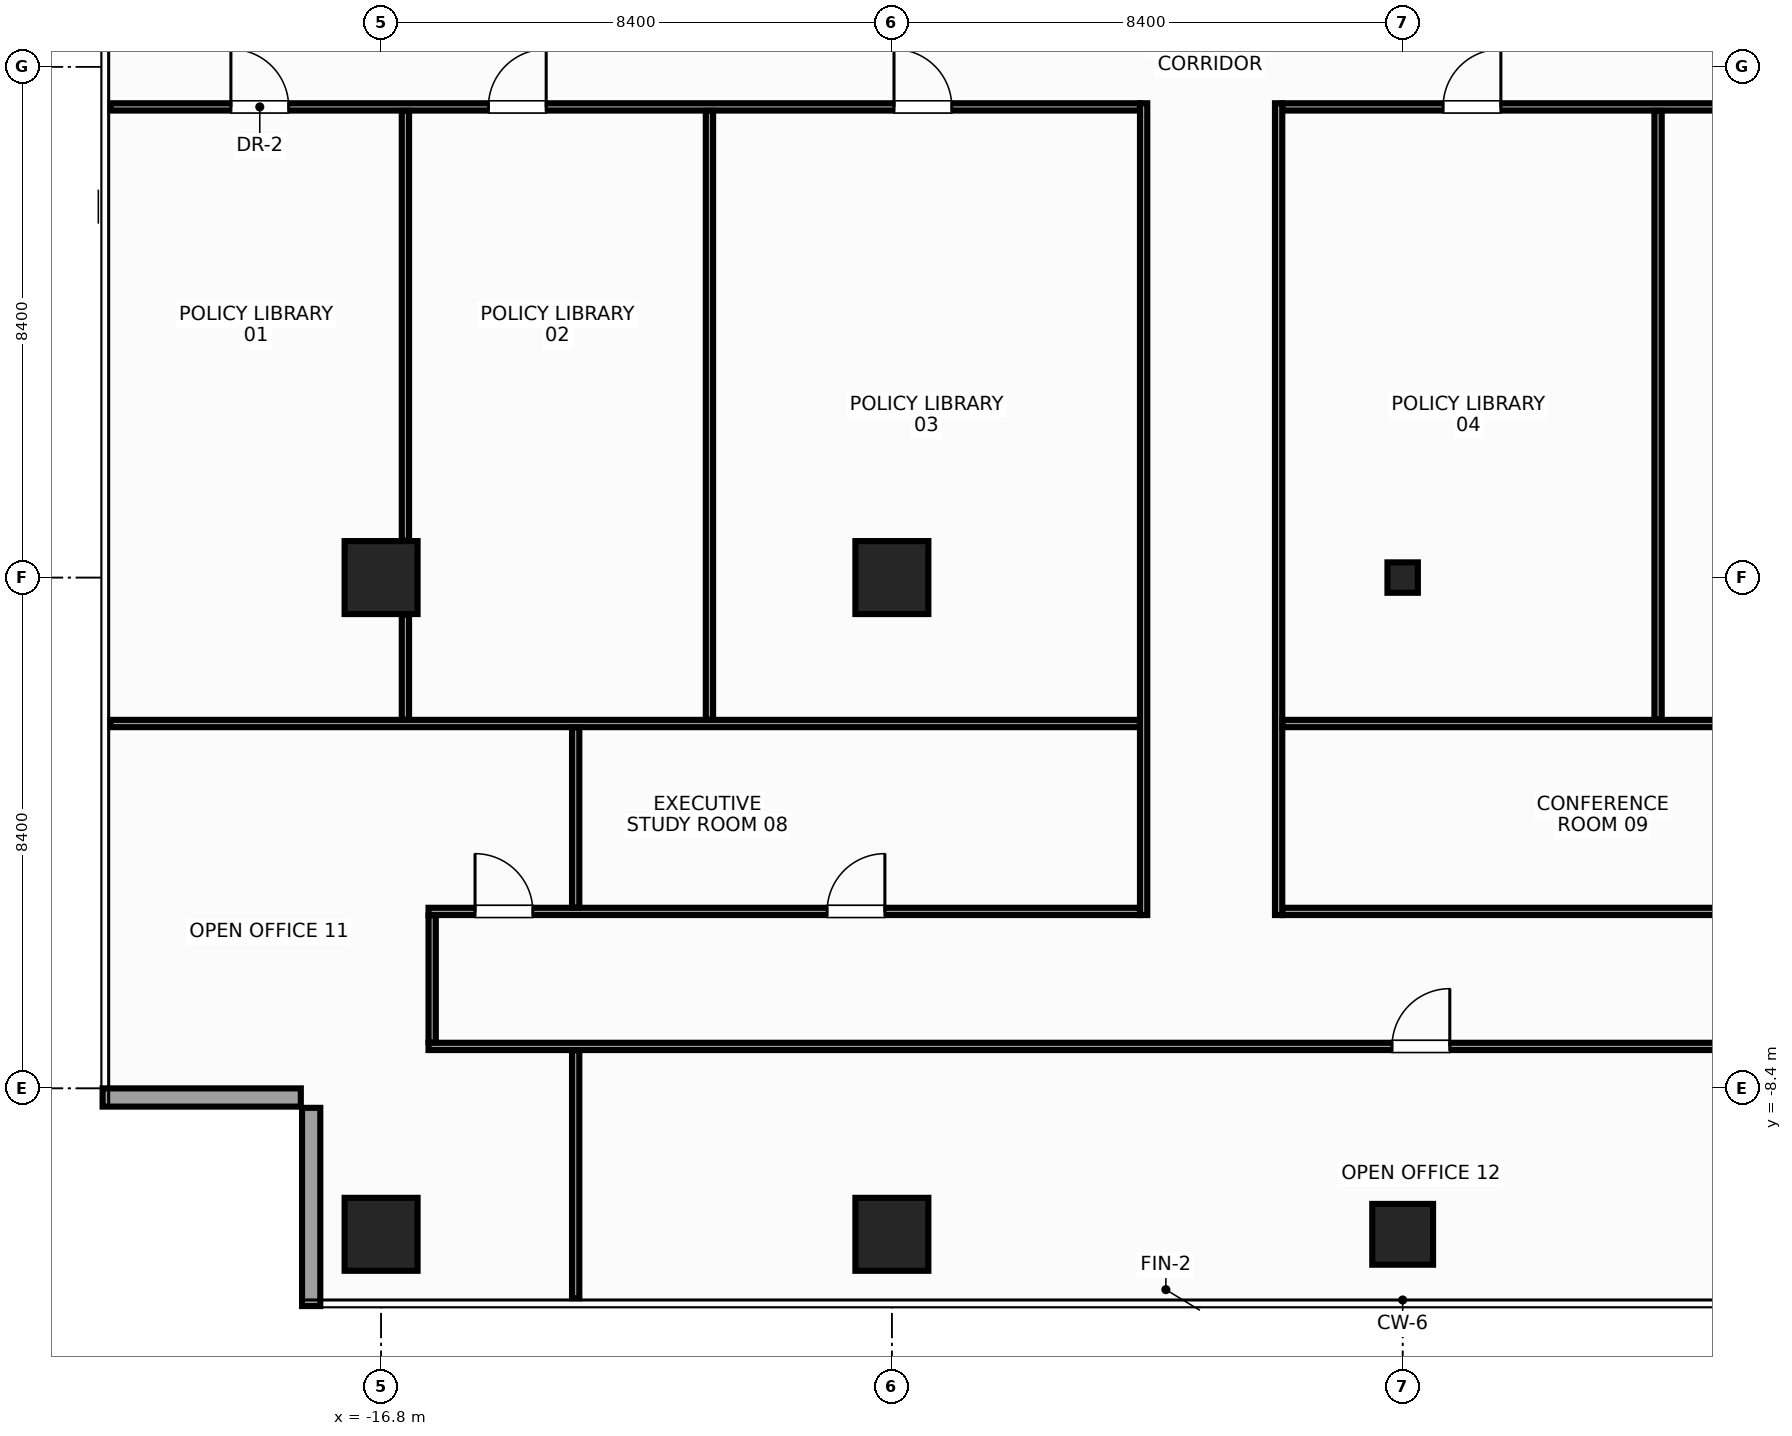
"""IFC4 building model, lengths in metres.
Left out: names, types, materials, properties, quantities, classifications, styles, units other than length and angle.
Written with IfcOpenShell. Run it as: python <this file> out.ifc"""

import sys

from ifc_helpers import new_model, si_unit, direction, frame, frame_2d, origin, origin_with_axes, origin_2d, place, context, subcontext, project, spatial, rectangle, hollow_rectangle, extrude, source, transform, mapped, element, fill, save


model = new_model("IFC4")
c1 = context("Model", 3, precision=1e-05, world=origin(), true_north=direction((0.0, 1.0)))
c2 = subcontext(c1, "Body", "Model", "MODEL_VIEW")
j1 = project(units=[si_unit("LENGTHUNIT", "METRE"), si_unit("PLANEANGLEUNIT", "RADIAN")], contexts=[c1])
p1 = place(None, origin())
s1 = spatial("IfcSite", under=j1, at=p1, CompositionType="ELEMENT")
p2 = place(p1, origin())
s2 = spatial("IfcBuilding", under=s1, at=p2, CompositionType="ELEMENT")
p3 = place(p2, frame((0.0, 0.0, 275.6)))
s3 = spatial("IfcBuildingStorey", under=s2, at=p3, CompositionType="ELEMENT", Elevation=275.6)
m1 = source(origin(), c2, "Body", "SweptSolid", [
    extrude(rectangle(XDim=1.2, YDim=1.2, at=origin_2d()), origin(), (0.0, 0.0, 1.0), 3.6),
])
for number, where, z_axis, x_axis in (
    (1, (-16.8, -10.8, 0.0), (0.0, 0.0, 1.0), (1.0, 0.0, 0.0)),
    (2, (-16.8, 0.0, 0.0), (0.0, 0.0, 1.0), (1.0, 0.0, 0.0)),
    (3, (-8.4, 0.0, 0.0), (0.0, 0.0, 1.0), (1.0, 0.0, 0.0)),
    (4, (-8.4, -10.8, 0.0), (0.0, 0.0, 1.0), (1.0, 0.0, 0.0)),
):
    element("IfcColumn", number, at=place(p3, frame(where, z_axis=z_axis, x_axis=x_axis)), inside=s3, PredefinedType="COLUMN", context=c2, shape_type="MappedRepresentation", body=[
        mapped(m1, transform((0.0, 0.0, 0.0), x_axis=(1.0, 0.0, 0.0), y_axis=(0.0, 1.0, 0.0), z_axis=(0.0, 0.0, 1.0), scale=1.0)),
    ])
m2 = source(origin(), c2, "Body", "SweptSolid", [
    extrude(rectangle(XDim=1.0, YDim=1.0, at=origin_2d()), origin(), (0.0, 0.0, 1.0), 3.6),
])
p4 = place(p3, frame((0.0, -10.8, 0.0), z_axis=(0.0, 0.0, 1.0), x_axis=(1.0, 0.0, 0.0)))
e5 = element("IfcColumn", 5, at=p4, inside=s3, PredefinedType="COLUMN", context=c2, shape_type="MappedRepresentation", body=[
    mapped(m2, transform((0.0, 0.0, 0.0), x_axis=(1.0, 0.0, 0.0), y_axis=(0.0, 1.0, 0.0), z_axis=(0.0, 0.0, 1.0), scale=1.0)),
])
m3 = source(origin(), c2, "Body", "SweptSolid", [
    extrude(hollow_rectangle(XDim=0.5, YDim=0.5, WallThickness=0.025, at=origin_2d()), origin(), (0.0, 0.0, 1.0), 3.6),
])
p5 = place(p3, origin_with_axes())
e6 = element("IfcColumn", 6, at=p5, inside=s3, PredefinedType="COLUMN", context=c2, shape_type="MappedRepresentation", body=[
    mapped(m3, transform((0.0, 0.0, 0.0), x_axis=(1.0, 0.0, 0.0), y_axis=(0.0, 1.0, 0.0), z_axis=(0.0, 0.0, 1.0), scale=1.0)),
])
m4 = source(origin(), c2, "Body", "SweptSolid", [
    extrude(rectangle(XDim=3.26, YDim=0.3, at=frame_2d((1.63, 0.0))), origin(), (0.0, 0.0, 1.0), 2.75),
])
p6 = place(p3, frame((-21.38, -8.55, 0.0), z_axis=(0.0, 0.0, 1.0), x_axis=(1.0, 0.0, 0.0)))
e7 = element("IfcWall", 7, at=p6, inside=s3, PredefinedType="STANDARD", context=c2, shape_type="MappedRepresentation", body=[
    mapped(m4, transform((0.0, 0.0, 0.0), x_axis=(1.0, 0.0, 0.0), y_axis=(0.0, 1.0, 0.0), z_axis=(0.0, 0.0, 1.0), scale=1.0)),
])
m5 = source(origin(), c2, "Body", "SweptSolid", [
    extrude(rectangle(XDim=3.26, YDim=0.3, at=frame_2d((1.63, 0.0))), origin(), (0.0, 0.0, 1.0), 2.75),
])
p7 = place(p3, frame((-17.95, -8.72, 0.0), z_axis=(0.0, 0.0, 1.0), x_axis=(0.0, -1.0, 0.0)))
e8 = element("IfcWall", 8, at=p7, inside=s3, PredefinedType="STANDARD", context=c2, shape_type="MappedRepresentation", body=[
    mapped(m5, transform((0.0, 0.0, 0.0), x_axis=(1.0, 0.0, 0.0), y_axis=(0.0, 1.0, 0.0), z_axis=(0.0, 0.0, 1.0), scale=1.0)),
])
m6 = source(origin(), c2, "Body", "SweptSolid", [
    extrude(rectangle(XDim=16.93, YDim=0.12, at=frame_2d((8.465, 0.0))), origin(), (0.0, 0.0, 1.0), 2.755),
])
p8 = place(p3, frame((-21.25, 7.74, 0.0), z_axis=(0.0, 0.0, 1.0), x_axis=(1.0, 0.0, 0.0)))
e9 = element("IfcWall", 9, at=p8, inside=s3, PredefinedType="PARTITIONING", context=c2, shape_type="MappedRepresentation", body=[
    mapped(m6, transform((0.0, 0.0, 0.0), x_axis=(1.0, 0.0, 0.0), y_axis=(0.0, 1.0, 0.0), z_axis=(0.0, 0.0, 1.0), scale=1.0)),
])
p9 = place(p8, frame((1.98, 0.0, 0.0)))
e10 = element("IfcOpeningElement", 10, at=p9, cuts=e9, PredefinedType="OPENING", context=c2, shape_type="SweptSolid", body=[
    extrude(rectangle(XDim=0.95, YDim=2.15, at=frame_2d((0.475, 1.075))), frame((0.0, 0.072, 0.0), z_axis=(0.0, -1.0, 0.0), x_axis=(1.0, 0.0, 0.0)), (0.0, 0.0, 1.0), 0.144),
])
p10 = place(p8, frame((6.215, 0.0, 0.0)))
e11 = element("IfcOpeningElement", 11, at=p10, cuts=e9, PredefinedType="OPENING", context=c2, shape_type="SweptSolid", body=[
    extrude(rectangle(XDim=0.95, YDim=2.15, at=frame_2d((0.475, 1.075))), frame((0.0, 0.072, 0.0), z_axis=(0.0, -1.0, 0.0), x_axis=(1.0, 0.0, 0.0)), (0.0, 0.0, 1.0), 0.144),
])
p11 = place(p8, frame((12.885, 0.0, 0.0)))
e12 = element("IfcOpeningElement", 12, at=p11, cuts=e9, PredefinedType="OPENING", context=c2, shape_type="SweptSolid", body=[
    extrude(rectangle(XDim=0.95, YDim=2.15, at=frame_2d((0.475, 1.075))), frame((0.0, 0.072, 0.0), z_axis=(0.0, -1.0, 0.0), x_axis=(1.0, 0.0, 0.0)), (0.0, 0.0, 1.0), 0.144),
])
m7 = source(origin(), c2, "Body", "SweptSolid", [
    extrude(rectangle(XDim=23.23, YDim=0.12, at=frame_2d((11.615, 0.0))), origin(), (0.0, 0.0, 1.0), 2.755),
])
p12 = place(p3, frame((-1.98, 7.74, 0.0), z_axis=(0.0, 0.0, 1.0), x_axis=(1.0, 0.0, 0.0)))
e13 = element("IfcWall", 13, at=p12, inside=s3, PredefinedType="PARTITIONING", context=c2, shape_type="MappedRepresentation", body=[
    mapped(m7, transform((0.0, 0.0, 0.0), x_axis=(1.0, 0.0, 0.0), y_axis=(0.0, 1.0, 0.0), z_axis=(0.0, 0.0, 1.0), scale=1.0)),
])
p13 = place(p12, frame((2.645, 0.0, 0.0)))
e14 = element("IfcOpeningElement", 14, at=p13, cuts=e13, PredefinedType="OPENING", context=c2, shape_type="SweptSolid", body=[
    extrude(rectangle(XDim=0.95, YDim=2.15, at=frame_2d((0.475, 1.075))), frame((0.0, 0.072, 0.0), z_axis=(0.0, -1.0, 0.0), x_axis=(1.0, 0.0, 0.0)), (0.0, 0.0, 1.0), 0.144),
])
p14 = place(p12, frame((9.305, 0.0, 0.0)))
e15 = element("IfcOpeningElement", 15, at=p14, cuts=e13, PredefinedType="OPENING", context=c2, shape_type="SweptSolid", body=[
    extrude(rectangle(XDim=0.95, YDim=2.15, at=frame_2d((0.475, 1.075))), frame((0.0, 0.072, 0.0), z_axis=(0.0, -1.0, 0.0), x_axis=(1.0, 0.0, 0.0)), (0.0, 0.0, 1.0), 0.144),
])
p15 = place(p12, frame((14.745, 0.0, 0.0)))
e16 = element("IfcOpeningElement", 16, at=p15, cuts=e13, PredefinedType="OPENING", context=c2, shape_type="SweptSolid", body=[
    extrude(rectangle(XDim=0.95, YDim=2.15, at=frame_2d((0.475, 1.075))), frame((0.0, 0.072, 0.0), z_axis=(0.0, -1.0, 0.0), x_axis=(1.0, 0.0, 0.0)), (0.0, 0.0, 1.0), 0.144),
])
p16 = place(p12, frame((20.3, 0.0, 0.0)))
e17 = element("IfcOpeningElement", 17, at=p16, cuts=e13, PredefinedType="OPENING", context=c2, shape_type="SweptSolid", body=[
    extrude(rectangle(XDim=0.95, YDim=2.15, at=frame_2d((0.475, 1.075))), frame((0.0, 0.072, 0.0), z_axis=(0.0, -1.0, 0.0), x_axis=(1.0, 0.0, 0.0)), (0.0, 0.0, 1.0), 0.144),
])
m8 = source(origin(), c2, "Body", "SweptSolid", [
    extrude(rectangle(XDim=11.7, YDim=0.12, at=frame_2d((5.85, 0.0))), origin(), (0.0, 0.0, 1.0), 2.755),
])
p17 = place(p3, frame((-16.02, -5.49, 0.0), z_axis=(0.0, 0.0, 1.0), x_axis=(1.0, 0.0, 0.0)))
e18 = element("IfcWall", 18, at=p17, inside=s3, PredefinedType="PARTITIONING", context=c2, shape_type="MappedRepresentation", body=[
    mapped(m8, transform((0.0, 0.0, 0.0), x_axis=(1.0, 0.0, 0.0), y_axis=(0.0, 1.0, 0.0), z_axis=(0.0, 0.0, 1.0), scale=1.0)),
])
p18 = place(p17, frame((6.555, 0.0, 0.0)))
e19 = element("IfcOpeningElement", 19, at=p18, cuts=e18, PredefinedType="OPENING", context=c2, shape_type="SweptSolid", body=[
    extrude(rectangle(XDim=0.95, YDim=2.15, at=frame_2d((0.475, 1.075))), frame((0.0, 0.072, 0.0), z_axis=(0.0, -1.0, 0.0), x_axis=(1.0, 0.0, 0.0)), (0.0, 0.0, 1.0), 0.144),
])
p19 = place(p17, frame((0.765, 0.0, 0.0)))
e20 = element("IfcOpeningElement", 20, at=p19, cuts=e18, PredefinedType="OPENING", context=c2, shape_type="SweptSolid", body=[
    extrude(rectangle(XDim=0.95, YDim=2.15, at=frame_2d((0.475, 1.075))), frame((0.0, 0.072, 0.0), z_axis=(0.0, -1.0, 0.0), x_axis=(1.0, 0.0, 0.0)), (0.0, 0.0, 1.0), 0.144),
])
m9 = source(origin(), c2, "Body", "SweptSolid", [
    extrude(rectangle(XDim=18.0, YDim=0.12, at=frame_2d((9.0, 0.0))), origin(), (0.0, 0.0, 1.0), 2.755),
])
p20 = place(p3, frame((-1.98, -5.49, 0.0), z_axis=(0.0, 0.0, 1.0), x_axis=(1.0, 0.0, 0.0)))
e21 = element("IfcWall", 21, at=p20, inside=s3, PredefinedType="PARTITIONING", context=c2, shape_type="MappedRepresentation", body=[
    mapped(m9, transform((0.0, 0.0, 0.0), x_axis=(1.0, 0.0, 0.0), y_axis=(0.0, 1.0, 0.0), z_axis=(0.0, 0.0, 1.0), scale=1.0)),
])
p21 = place(p20, frame((7.645, 0.0, 0.0)))
e22 = element("IfcOpeningElement", 22, at=p21, cuts=e21, PredefinedType="OPENING", context=c2, shape_type="SweptSolid", body=[
    extrude(rectangle(XDim=0.95, YDim=2.15, at=frame_2d((0.475, 1.075))), frame((0.0, 0.072, 0.0), z_axis=(0.0, -1.0, 0.0), x_axis=(1.0, 0.0, 0.0)), (0.0, 0.0, 1.0), 0.144),
])
p22 = place(p20, frame((16.585, 0.0, 0.0)))
e23 = element("IfcOpeningElement", 23, at=p22, cuts=e21, PredefinedType="OPENING", context=c2, shape_type="SweptSolid", body=[
    extrude(rectangle(XDim=0.95, YDim=2.15, at=frame_2d((0.475, 1.075))), frame((0.0, 0.072, 0.0), z_axis=(0.0, -1.0, 0.0), x_axis=(1.0, 0.0, 0.0)), (0.0, 0.0, 1.0), 0.144),
])
m10 = source(origin(), c2, "Body", "SweptSolid", [
    extrude(rectangle(XDim=32.04, YDim=0.12, at=frame_2d((16.02, 0.0))), origin(), (0.0, 0.0, 1.0), 2.755),
])
p23 = place(p3, frame((-16.02, -7.71, 0.0), z_axis=(0.0, 0.0, 1.0), x_axis=(1.0, 0.0, 0.0)))
e24 = element("IfcWall", 24, at=p23, inside=s3, PredefinedType="PARTITIONING", context=c2, shape_type="MappedRepresentation", body=[
    mapped(m10, transform((0.0, 0.0, 0.0), x_axis=(1.0, 0.0, 0.0), y_axis=(0.0, 1.0, 0.0), z_axis=(0.0, 0.0, 1.0), scale=1.0)),
])
p24 = place(p23, frame((15.845, 0.0, 0.0)))
e25 = element("IfcOpeningElement", 25, at=p24, cuts=e24, PredefinedType="OPENING", context=c2, shape_type="SweptSolid", body=[
    extrude(rectangle(XDim=0.95, YDim=2.15, at=frame_2d((0.475, 1.075))), frame((0.0, 0.072, 0.0), z_axis=(0.0, -1.0, 0.0), x_axis=(1.0, 0.0, 0.0)), (0.0, 0.0, 1.0), 0.144),
])
m11 = source(origin(), c2, "Body", "SweptSolid", [
    extrude(rectangle(XDim=13.35, YDim=0.12, at=frame_2d((6.675, 0.0))), origin(), (0.0, 0.0, 1.0), 2.655),
])
for number, where, z_axis, x_axis in (
    (26, (-4.26, -5.55, 0.0), (0.0, 0.0, 1.0), (0.0, 1.0, 0.0)),
    (27, (-2.04, -5.55, 0.0), (0.0, 0.0, 1.0), (0.0, 1.0, 0.0)),
):
    element("IfcWall", number, at=place(p3, frame(where, z_axis=z_axis, x_axis=x_axis)), inside=s3, PredefinedType="PARTITIONING", context=c2, shape_type="MappedRepresentation", body=[
        mapped(m11, transform((0.0, 0.0, 0.0), x_axis=(1.0, 0.0, 0.0), y_axis=(0.0, 1.0, 0.0), z_axis=(0.0, 0.0, 1.0), scale=1.0)),
    ])
m12 = source(origin(), c2, "Body", "SweptSolid", [
    extrude(rectangle(XDim=2.09, YDim=0.12, at=frame_2d((1.045, 0.0))), origin(), (0.0, 0.0, 1.0), 3.37),
])
p25 = place(p3, frame((-15.96, -7.645, 0.0), z_axis=(0.0, 0.0, 1.0), x_axis=(0.0, 1.0, 0.0)))
e28 = element("IfcWall", 28, at=p25, inside=s3, PredefinedType="PARTITIONING", context=c2, shape_type="MappedRepresentation", body=[
    mapped(m12, transform((0.0, 0.0, 0.0), x_axis=(1.0, 0.0, 0.0), y_axis=(0.0, 1.0, 0.0), z_axis=(0.0, 0.0, 1.0), scale=1.0)),
])
m13 = source(origin(), c2, "Body", "SweptSolid", [
    extrude(rectangle(XDim=16.925, YDim=0.12, at=frame_2d((8.462, 0.0))), origin(), (0.0, 0.0, 1.0), 2.755),
])
p26 = place(p3, frame((-21.25, -2.4, 0.0), z_axis=(0.0, 0.0, 1.0), x_axis=(1.0, 0.0, 0.0)))
e29 = element("IfcWall", 29, at=p26, inside=s3, PredefinedType="PARTITIONING", context=c2, shape_type="MappedRepresentation", body=[
    mapped(m13, transform((0.0, 0.0, 0.0), x_axis=(1.0, 0.0, 0.0), y_axis=(0.0, 1.0, 0.0), z_axis=(0.0, 0.0, 1.0), scale=1.0)),
])
m14 = source(origin(), c2, "Body", "SweptSolid", [
    extrude(rectangle(XDim=23.225, YDim=0.12, at=frame_2d((11.613, 0.0))), origin(), (0.0, 0.0, 1.0), 2.755),
])
p27 = place(p3, frame((-1.975, -2.4, 0.0), z_axis=(0.0, 0.0, 1.0), x_axis=(1.0, 0.0, 0.0)))
e30 = element("IfcWall", 30, at=p27, inside=s3, PredefinedType="PARTITIONING", context=c2, shape_type="MappedRepresentation", body=[
    mapped(m14, transform((0.0, 0.0, 0.0), x_axis=(1.0, 0.0, 0.0), y_axis=(0.0, 1.0, 0.0), z_axis=(0.0, 0.0, 1.0), scale=1.0)),
])
m15 = source(origin(), c2, "Body", "SweptSolid", [
    extrude(rectangle(XDim=1.725, YDim=0.12, at=frame_2d((0.862, 0.0))), origin(), (0.0, 0.0, 1.0), 3.37),
])
p28 = place(p3, frame((-16.4, -2.335, 0.0), z_axis=(0.0, 0.0, 1.0), x_axis=(0.0, 1.0, 0.0)))
e31 = element("IfcWall", 31, at=p28, inside=s3, PredefinedType="PARTITIONING", context=c2, shape_type="MappedRepresentation", body=[
    mapped(m15, transform((0.0, 0.0, 0.0), x_axis=(1.0, 0.0, 0.0), y_axis=(0.0, 1.0, 0.0), z_axis=(0.0, 0.0, 1.0), scale=1.0)),
])
m16 = source(origin(), c2, "Body", "SweptSolid", [
    extrude(rectangle(XDim=7.065, YDim=0.12, at=frame_2d((3.532, 0.0))), origin(), (0.0, 0.0, 1.0), 2.655),
])
p29 = place(p3, frame((-16.4, 0.61, 0.0), z_axis=(0.0, 0.0, 1.0), x_axis=(0.0, 1.0, 0.0)))
e32 = element("IfcWall", 32, at=p29, inside=s3, PredefinedType="PARTITIONING", context=c2, shape_type="MappedRepresentation", body=[
    mapped(m16, transform((0.0, 0.0, 0.0), x_axis=(1.0, 0.0, 0.0), y_axis=(0.0, 1.0, 0.0), z_axis=(0.0, 0.0, 1.0), scale=1.0)),
])
m17 = source(origin(), c2, "Body", "SweptSolid", [
    extrude(rectangle(XDim=10.01, YDim=0.12, at=frame_2d((5.005, 0.0))), origin(), (0.0, 0.0, 1.0), 2.655),
])
for number, where, z_axis, x_axis in (
    (33, (-11.4, -2.335, 0.0), (0.0, 0.0, 1.0), (0.0, 1.0, 0.0)),
    (34, (4.2, -2.335, 0.0), (0.0, 0.0, 1.0), (0.0, 1.0, 0.0)),
):
    element("IfcWall", number, at=place(p3, frame(where, z_axis=z_axis, x_axis=x_axis)), inside=s3, PredefinedType="PARTITIONING", context=c2, shape_type="MappedRepresentation", body=[
        mapped(m17, transform((0.0, 0.0, 0.0), x_axis=(1.0, 0.0, 0.0), y_axis=(0.0, 1.0, 0.0), z_axis=(0.0, 0.0, 1.0), scale=1.0)),
    ])
m18 = source(origin(), c2, "Body", "SweptSolid", [
    extrude(rectangle(XDim=4.075, YDim=0.12, at=frame_2d((2.038, 0.0))), origin(), (0.0, 0.0, 1.0), 2.905),
])
p30 = place(p3, frame((-13.6, -11.85, 0.0), z_axis=(0.0, 0.0, 1.0), x_axis=(0.0, 1.0, 0.0)))
e35 = element("IfcWall", 35, at=p30, inside=s3, PredefinedType="PARTITIONING", context=c2, shape_type="MappedRepresentation", body=[
    mapped(m18, transform((0.0, 0.0, 0.0), x_axis=(1.0, 0.0, 0.0), y_axis=(0.0, 1.0, 0.0), z_axis=(0.0, 0.0, 1.0), scale=1.0)),
])
m19 = source(origin(), c2, "Body", "SweptSolid", [
    extrude(rectangle(XDim=2.96, YDim=0.12, at=frame_2d((1.48, 0.0))), origin(), (0.0, 0.0, 1.0), 3.37),
])
p31 = place(p3, frame((-13.6, -5.425, 0.0), z_axis=(0.0, 0.0, 1.0), x_axis=(0.0, 1.0, 0.0)))
e36 = element("IfcWall", 36, at=p31, inside=s3, PredefinedType="PARTITIONING", context=c2, shape_type="MappedRepresentation", body=[
    mapped(m19, transform((0.0, 0.0, 0.0), x_axis=(1.0, 0.0, 0.0), y_axis=(0.0, 1.0, 0.0), z_axis=(0.0, 0.0, 1.0), scale=1.0)),
])
m20 = source(origin(), c2, "Body", "SweptSolid", [
    extrude(rectangle(XDim=0.95, YDim=2.15, at=frame_2d((0.475, 1.075))), frame((0.0, 0.025, 0.0), z_axis=(0.0, -1.0, 0.0), x_axis=(1.0, 0.0, 0.0)), (0.0, 0.0, 1.0), 0.05),
])
p32 = place(p9, origin())
e37 = element("IfcDoor", 37, at=p32, inside=s3, OperationType="SINGLE_SWING_LEFT", PredefinedType="DOOR", context=c2, shape_type="MappedRepresentation", body=[
    mapped(m20, transform((0.0, 0.0, 0.0), x_axis=(1.0, 0.0, 0.0), y_axis=(0.0, 1.0, 0.0), z_axis=(0.0, 0.0, 1.0), scale=1.0)),
])
fill(e10, e37)
p33 = place(p10, origin())
e38 = element("IfcDoor", 38, at=p33, inside=s3, OperationType="SINGLE_SWING_RIGHT", PredefinedType="DOOR", context=c2, shape_type="MappedRepresentation", body=[
    mapped(m20, transform((0.0, 0.0, 0.0), x_axis=(1.0, 0.0, 0.0), y_axis=(0.0, 1.0, 0.0), z_axis=(0.0, 0.0, 1.0), scale=1.0)),
])
fill(e11, e38)
p34 = place(p11, origin())
e39 = element("IfcDoor", 39, at=p34, inside=s3, OperationType="SINGLE_SWING_LEFT", PredefinedType="DOOR", context=c2, shape_type="MappedRepresentation", body=[
    mapped(m20, transform((0.0, 0.0, 0.0), x_axis=(1.0, 0.0, 0.0), y_axis=(0.0, 1.0, 0.0), z_axis=(0.0, 0.0, 1.0), scale=1.0)),
])
fill(e12, e39)
p35 = place(p13, origin())
e40 = element("IfcDoor", 40, at=p35, inside=s3, OperationType="SINGLE_SWING_RIGHT", PredefinedType="DOOR", context=c2, shape_type="MappedRepresentation", body=[
    mapped(m20, transform((0.0, 0.0, 0.0), x_axis=(1.0, 0.0, 0.0), y_axis=(0.0, 1.0, 0.0), z_axis=(0.0, 0.0, 1.0), scale=1.0)),
])
fill(e14, e40)
p36 = place(p18, origin())
e41 = element("IfcDoor", 41, at=p36, inside=s3, OperationType="SINGLE_SWING_RIGHT", PredefinedType="DOOR", context=c2, shape_type="MappedRepresentation", body=[
    mapped(m20, transform((0.0, 0.0, 0.0), x_axis=(1.0, 0.0, 0.0), y_axis=(0.0, 1.0, 0.0), z_axis=(0.0, 0.0, 1.0), scale=1.0)),
])
fill(e19, e41)
p37 = place(p19, origin())
e42 = element("IfcDoor", 42, at=p37, inside=s3, OperationType="SINGLE_SWING_LEFT", PredefinedType="DOOR", context=c2, shape_type="MappedRepresentation", body=[
    mapped(m20, transform((0.0, 0.0, 0.0), x_axis=(1.0, 0.0, 0.0), y_axis=(0.0, 1.0, 0.0), z_axis=(0.0, 0.0, 1.0), scale=1.0)),
])
fill(e20, e42)
p38 = place(p24, origin())
e43 = element("IfcDoor", 43, at=p38, inside=s3, OperationType="SINGLE_SWING_RIGHT", PredefinedType="DOOR", context=c2, shape_type="MappedRepresentation", body=[
    mapped(m20, transform((0.0, 0.0, 0.0), x_axis=(1.0, 0.0, 0.0), y_axis=(0.0, 1.0, 0.0), z_axis=(0.0, 0.0, 1.0), scale=1.0)),
])
fill(e25, e43)
save(model, sys.argv[1])
